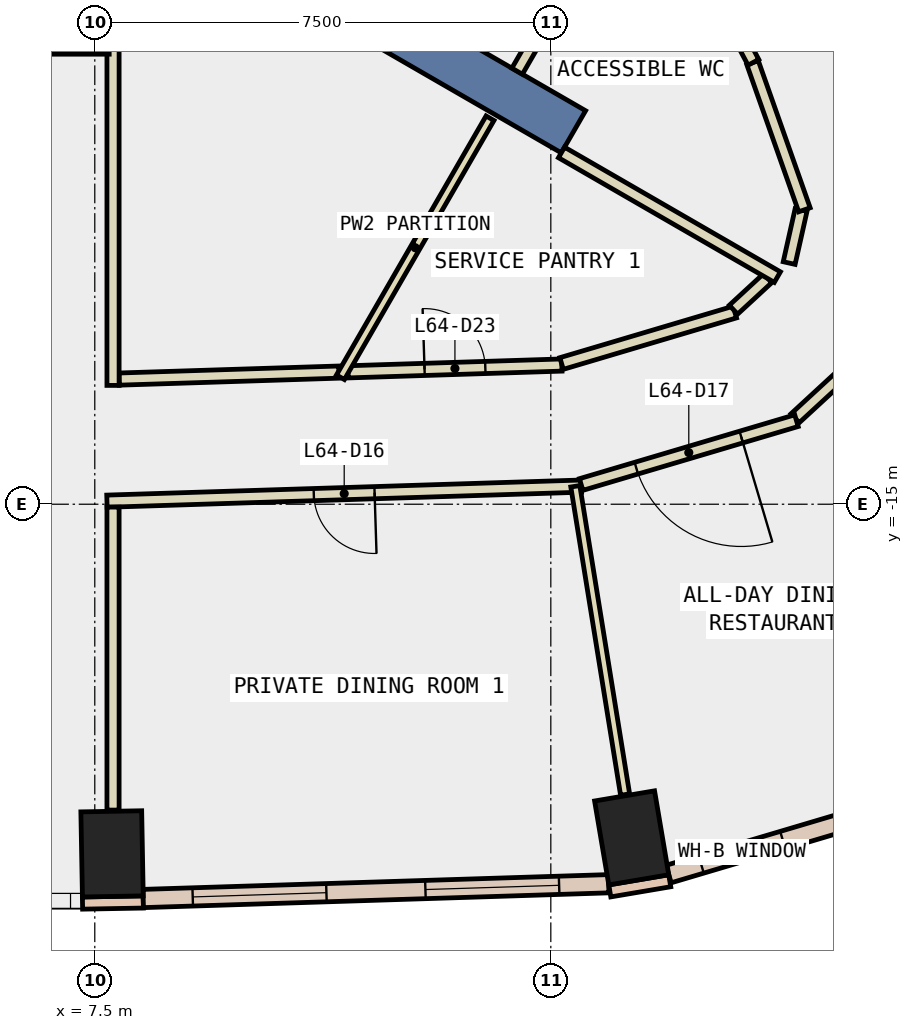
"""IFC4 building model, lengths in metres.
Left out: names, types, materials, properties, quantities, classifications, styles, units other than length and angle.
Written with IfcOpenShell. Run it as: python <this file> out.ifc"""

import sys

from ifc_helpers import new_model, si_unit, direction, frame, frame_2d, origin, origin_2d, place, context, subcontext, project, spatial, rectangle, extrude, element, fill, save


model = new_model("IFC4")
c1 = context("Model", 3, precision=1e-05, world=origin(), true_north=direction((0.0, 1.0)))
c2 = subcontext(c1, "Body", "Model", "MODEL_VIEW")
j1 = project(units=[si_unit("LENGTHUNIT", "METRE"), si_unit("PLANEANGLEUNIT", "RADIAN")], contexts=[c1])
p1 = place(None, origin())
s1 = spatial("IfcSite", under=j1, at=p1, CompositionType="ELEMENT")
p2 = place(p1, origin())
s2 = spatial("IfcBuilding", under=s1, at=p2, CompositionType="ELEMENT")
p3 = place(p2, frame((0.0, 0.0, 277.4)))
s3 = spatial("IfcBuildingStorey", under=s2, at=p3, CompositionType="ELEMENT", Elevation=277.4)
for number, where, z_axis, x_axis in (
    (1, (7.784, -20.75, -0.34), (0.0, 0.0, 1.0), (1.0, 0.018, 0.0)),
    (2, (16.33, -20.487, -0.34), (0.0, 0.0, 1.0), (0.986, 0.167, 0.0)),
):
    element("IfcColumn", number, at=place(p3, frame(where, z_axis=z_axis, x_axis=x_axis)), inside=s3, PredefinedType="COLUMN", context=c2, shape_type="SweptSolid", body=[
        extrude(rectangle(XDim=1.0, YDim=1.4, at=origin_2d()), origin(), (0.0, 0.0, 1.0), 3.34),
    ])
p4 = place(p3, frame((7.578, -4.375, -0.34), z_axis=(0.0, 0.0, 1.0), x_axis=(0.866024315419, -0.5000018851, 0.0)))
e3 = element("IfcWall", 3, at=p4, inside=s3, PredefinedType="SHEAR", context=c2, shape_type="SweptSolid", body=[
    extrude(rectangle(XDim=9.0, YDim=0.8, at=frame_2d((4.5, 0.0))), origin(), (0.0, 0.0, 1.0), 3.34),
])
for number, where, z_axis, x_axis in (
    (4, (7.298, -21.559, 0.0), (0.0, 0.0, 1.0), (1.0, 0.018, 0.0)),
    (5, (15.97, -21.359, 0.0), (0.0, 0.0, 1.0), (0.986, 0.167, 0.0)),
):
    element("IfcWall", number, at=place(p3, frame(where, z_axis=z_axis, x_axis=x_axis)), inside=s3, PredefinedType="STANDARD", context=c2, shape_type="SweptSolid", body=[
        extrude(rectangle(XDim=1.0, YDim=0.2, at=frame_2d((0.5, 0.0))), origin(), (0.0, 0.0, 1.0), 3.0),
    ])
p5 = place(p3, frame((8.296, -21.484, 0.0), z_axis=(0.0, 0.0, 1.0), x_axis=(0.999496876383, 0.031717410046, 0.0)))
e6 = element("IfcWall", 6, at=p5, inside=s3, PredefinedType="STANDARD", context=c2, shape_type="SweptSolid", body=[
    extrude(rectangle(XDim=7.659, YDim=0.3, at=frame_2d((3.83, 0.0))), origin(), (0.0, 0.0, 1.0), 3.0),
])
p6 = place(p5, frame((0.815, 0.0, 0.9)))
e7 = element("IfcOpeningElement", 7, at=p6, cuts=e6, PredefinedType="OPENING", context=c2, shape_type="SweptSolid", body=[
    extrude(rectangle(XDim=2.2, YDim=2.0, at=frame_2d((1.1, 1.0))), frame((0.0, 0.16, 0.0), z_axis=(0.0, -1.0, 0.0), x_axis=(1.0, 0.0, 0.0)), (0.0, 0.0, 1.0), 0.32),
])
p7 = place(p5, frame((4.644, 0.0, 0.9)))
e8 = element("IfcOpeningElement", 8, at=p7, cuts=e6, PredefinedType="OPENING", context=c2, shape_type="SweptSolid", body=[
    extrude(rectangle(XDim=2.2, YDim=2.0, at=frame_2d((1.1, 1.0))), frame((0.0, 0.16, 0.0), z_axis=(0.0, -1.0, 0.0), x_axis=(1.0, 0.0, 0.0)), (0.0, 0.0, 1.0), 0.32),
])
p8 = place(p3, frame((16.937, -21.082, 0.0), z_axis=(0.0, 0.0, 1.0), x_axis=(0.95864045837, 0.284619872067, 0.0)))
e9 = element("IfcWall", 9, at=p8, inside=s3, PredefinedType="STANDARD", context=c2, shape_type="SweptSolid", body=[
    extrude(rectangle(XDim=5.035, YDim=0.3, at=frame_2d((2.518, 0.0))), origin(), (0.0, 0.0, 1.0), 3.0),
])
p9 = place(p8, frame((0.559, 0.0, 0.9)))
e10 = element("IfcOpeningElement", 10, at=p9, cuts=e9, PredefinedType="OPENING", context=c2, shape_type="SweptSolid", body=[
    extrude(rectangle(XDim=1.4, YDim=2.0, at=frame_2d((0.7, 1.0))), frame((0.0, 0.16, 0.0), z_axis=(0.0, -1.0, 0.0), x_axis=(1.0, 0.0, 0.0)), (0.0, 0.0, 1.0), 0.32),
])
p10 = place(p8, frame((3.076, 0.0, 0.9)))
e11 = element("IfcOpeningElement", 11, at=p10, cuts=e9, PredefinedType="OPENING", context=c2, shape_type="SweptSolid", body=[
    extrude(rectangle(XDim=1.4, YDim=2.0, at=frame_2d((0.7, 1.0))), frame((0.0, 0.16, 0.0), z_axis=(0.0, -1.0, 0.0), x_axis=(1.0, 0.0, 0.0)), (0.0, 0.0, 1.0), 0.32),
])
p11 = place(p3, frame((7.9, -12.942, 0.0), z_axis=(0.0, 0.0, 1.0), x_axis=(0.999494468474, 0.031793198801, 0.0)))
e12 = element("IfcWall", 12, at=p11, inside=s3, PredefinedType="PARTITIONING", context=c2, shape_type="SweptSolid", body=[
    extrude(rectangle(XDim=3.617, YDim=0.2, at=frame_2d((1.808, 0.0))), origin(), (0.0, 0.0, 1.0), 3.0),
])
p12 = place(p3, frame((11.665, -12.823, 0.0), z_axis=(0.0, 0.0, 1.0), x_axis=(0.99949244941, 0.03185660956, 0.0)))
e13 = element("IfcWall", 13, at=p12, inside=s3, PredefinedType="PARTITIONING", context=c2, shape_type="SweptSolid", body=[
    extrude(rectangle(XDim=3.518, YDim=0.2, at=frame_2d((1.759, 0.0))), origin(), (0.0, 0.0, 1.0), 3.0),
])
p13 = place(p12, frame((1.259, 0.0, 0.0)))
e14 = element("IfcOpeningElement", 14, at=p13, cuts=e13, PredefinedType="OPENING", context=c2, shape_type="SweptSolid", body=[
    extrude(rectangle(XDim=1.0, YDim=2.1, at=frame_2d((0.5, 1.05))), frame((0.0, 0.11, 0.0), z_axis=(0.0, -1.0, 0.0), x_axis=(1.0, 0.0, 0.0)), (0.0, 0.0, 1.0), 0.22),
])
p14 = place(p3, frame((15.177, -12.686, 0.0), z_axis=(0.0, 0.0, 1.0), x_axis=(0.958629704259, 0.284656090947, 0.0)))
e15 = element("IfcWall", 15, at=p14, inside=s3, PredefinedType="PARTITIONING", context=c2, shape_type="SweptSolid", body=[
    extrude(rectangle(XDim=2.972, YDim=0.2, at=frame_2d((1.486, 0.0))), origin(), (0.0, 0.0, 1.0), 3.0),
])
p15 = place(p3, frame((18.004, -11.801, 0.0), z_axis=(0.0, 0.0, 1.0), x_axis=(0.735268601872, 0.677775835436, 0.0)))
e16 = element("IfcWall", 16, at=p15, inside=s3, PredefinedType="PARTITIONING", context=c2, shape_type="SweptSolid", body=[
    extrude(rectangle(XDim=0.764, YDim=0.2, at=frame_2d((0.382, 0.0))), origin(), (0.0, 0.0, 1.0), 3.0),
])
p16 = place(p3, frame((18.92, -11.034, 0.0), z_axis=(0.0, 0.0, 1.0), x_axis=(0.219096654714, 0.975703159723, 0.0)))
e17 = element("IfcWall", 17, at=p16, inside=s3, PredefinedType="PARTITIONING", context=c2, shape_type="SweptSolid", body=[
    extrude(rectangle(XDim=0.895, YDim=0.2, at=frame_2d((0.447, 0.0))), origin(), (0.0, 0.0, 1.0), 3.0),
])
p17 = place(p3, frame((19.171, -10.158, 0.0), z_axis=(0.0, 0.0, 1.0), x_axis=(-0.332486504777, 0.943108012977, 0.0)))
e18 = element("IfcWall", 18, at=p17, inside=s3, PredefinedType="PARTITIONING", context=c2, shape_type="SweptSolid", body=[
    extrude(rectangle(XDim=2.565, YDim=0.2, at=frame_2d((1.282, 0.0))), origin(), (0.0, 0.0, 1.0), 3.0),
])
p18 = place(p3, frame((18.332, -7.733, 0.0), z_axis=(0.0, 0.0, 1.0), x_axis=(-0.469639737924, 0.882858152006, 0.0)))
e19 = element("IfcWall", 19, at=p18, inside=s3, PredefinedType="PARTITIONING", context=c2, shape_type="SweptSolid", body=[
    extrude(rectangle(XDim=3.782, YDim=0.2, at=frame_2d((1.891, 0.0))), origin(), (0.0, 0.0, 1.0), 3.0),
])
p19 = place(p18, frame((1.391, 0.0, 0.0)))
e20 = element("IfcOpeningElement", 20, at=p19, cuts=e19, PredefinedType="OPENING", context=c2, shape_type="SweptSolid", body=[
    extrude(rectangle(XDim=1.0, YDim=2.1, at=frame_2d((0.5, 1.05))), frame((0.0, 0.11, 0.0), z_axis=(0.0, -1.0, 0.0), x_axis=(1.0, 0.0, 0.0)), (0.0, 0.0, 1.0), 0.22),
])
p20 = place(p3, frame((15.503, -14.702, 0.0), z_axis=(0.0, 0.0, 1.0), x_axis=(-0.999495120537, -0.031772693047, 0.0)))
e21 = element("IfcWall", 21, at=p20, inside=s3, PredefinedType="PARTITIONING", context=c2, shape_type="SweptSolid", body=[
    extrude(rectangle(XDim=7.807, YDim=0.2, at=frame_2d((3.903, 0.0))), origin(), (0.0, 0.0, 1.0), 3.0),
])
p21 = place(p20, frame((3.403, 0.0, 0.0)))
e22 = element("IfcOpeningElement", 22, at=p21, cuts=e21, PredefinedType="OPENING", context=c2, shape_type="SweptSolid", body=[
    extrude(rectangle(XDim=1.0, YDim=2.1, at=frame_2d((0.5, 1.05))), frame((0.0, 0.11, 0.0), z_axis=(0.0, -1.0, 0.0), x_axis=(1.0, 0.0, 0.0)), (0.0, 0.0, 1.0), 0.22),
])
p22 = place(p3, frame((20.83, -11.917, 0.0), z_axis=(0.0, 0.0, 1.0), x_axis=(-0.735547704352, -0.67747293276, 0.0)))
e23 = element("IfcWall", 23, at=p22, inside=s3, PredefinedType="PARTITIONING", context=c2, shape_type="SweptSolid", body=[
    extrude(rectangle(XDim=2.463, YDim=0.2, at=frame_2d((1.232, 0.0))), origin(), (0.0, 0.0, 1.0), 3.0),
])
p23 = place(p3, frame((19.04, -13.626, 0.0), z_axis=(0.0, 0.0, 1.0), x_axis=(-0.958734738219, -0.284302131073, 0.0)))
e24 = element("IfcWall", 24, at=p23, inside=s3, PredefinedType="PARTITIONING", context=c2, shape_type="SweptSolid", body=[
    extrude(rectangle(XDim=3.693, YDim=0.2, at=frame_2d((1.847, 0.0))), origin(), (0.0, 0.0, 1.0), 3.0),
])
p24 = place(p23, frame((0.947, 0.0, 0.0)))
e25 = element("IfcOpeningElement", 25, at=p24, cuts=e24, PredefinedType="OPENING", context=c2, shape_type="SweptSolid", body=[
    extrude(rectangle(XDim=1.8, YDim=2.1, at=frame_2d((0.9, 1.05))), frame((0.0, 0.11, 0.0), z_axis=(0.0, -1.0, 0.0), x_axis=(1.0, 0.0, 0.0)), (0.0, 0.0, 1.0), 0.22),
])
p25 = place(p3, frame((7.8, -7.499, 0.0), z_axis=(0.0, 0.0, 1.0), x_axis=(0.0, -1.0, 0.0)))
e26 = element("IfcWall", 26, at=p25, inside=s3, PredefinedType="PARTITIONING", context=c2, shape_type="SweptSolid", body=[
    extrude(rectangle(XDim=5.547, YDim=0.2, at=frame_2d((2.773, 0.0))), origin(), (0.0, 0.0, 1.0), 3.0),
])
p26 = place(p3, frame((7.8, -15.047, 0.0), z_axis=(0.0, 0.0, 1.0), x_axis=(0.0, -1.0, 0.0)))
e27 = element("IfcWall", 27, at=p26, inside=s3, PredefinedType="PARTITIONING", context=c2, shape_type="SweptSolid", body=[
    extrude(rectangle(XDim=4.983, YDim=0.2, at=frame_2d((2.491, 0.0))), origin(), (0.0, 0.0, 1.0), 3.0),
])
p27 = place(p3, frame((14.0, -8.652, 0.0), z_axis=(0.0, 0.0, 1.0), x_axis=(-0.500067562424, -0.865986393087, 0.0)))
e28 = element("IfcWall", 28, at=p27, inside=s3, PredefinedType="PARTITIONING", context=c2, shape_type="SweptSolid", body=[
    extrude(rectangle(XDim=4.919, YDim=0.15, at=frame_2d((2.459, 0.0))), origin(), (0.0, 0.0, 1.0), 3.0),
])
p28 = place(p3, frame((16.559, -4.219, 0.0), z_axis=(0.0, 0.0, 1.0), x_axis=(-0.499997491977, -0.866026851788, 0.0)))
e29 = element("IfcWall", 29, at=p28, inside=s3, PredefinedType="PARTITIONING", context=c2, shape_type="SweptSolid", body=[
    extrude(rectangle(XDim=4.226, YDim=0.2, at=frame_2d((2.113, 0.0))), origin(), (0.0, 0.0, 1.0), 3.0),
])
p29 = place(p3, frame((15.176, -9.215, 0.0), z_axis=(0.0, 0.0, 1.0), x_axis=(0.866006068523, -0.500033488159, 0.0)))
e30 = element("IfcWall", 30, at=p29, inside=s3, PredefinedType="PARTITIONING", context=c2, shape_type="SweptSolid", body=[
    extrude(rectangle(XDim=4.099, YDim=0.2, at=frame_2d((2.05, 0.0))), origin(), (0.0, 0.0, 1.0), 3.0),
])
p30 = place(p3, frame((15.403, -14.705, 0.0), z_axis=(0.0, 0.0, 1.0), x_axis=(0.159447664828, -0.98720638277, 0.0)))
e31 = element("IfcWall", 31, at=p30, inside=s3, PredefinedType="PARTITIONING", context=c2, shape_type="SweptSolid", body=[
    extrude(rectangle(XDim=5.135, YDim=0.15, at=frame_2d((2.568, 0.0))), origin(), (0.0, 0.0, 1.0), 3.0),
])
p31 = place(p3, frame((5.944, -7.499, 0.0), z_axis=(0.0, 0.0, 1.0), x_axis=(1.0, 0.0, 0.0)))
e32 = element("IfcWall", 32, at=p31, inside=s3, PredefinedType="PARTITIONING", context=c2, shape_type="SweptSolid", body=[
    extrude(rectangle(XDim=1.793, YDim=0.2, at=frame_2d((0.896, 0.0))), origin(), (0.0, 0.0, 1.0), 3.0),
])
p32 = place(p6, origin())
e33 = element("IfcWindow", 33, at=p32, inside=s3, PartitioningType="SINGLE_PANEL", PredefinedType="WINDOW", context=c2, shape_type="SweptSolid", body=[
    extrude(rectangle(XDim=2.2, YDim=2.0, at=frame_2d((1.1, 1.0))), frame((0.0, 0.03, 0.0), z_axis=(0.0, -1.0, 0.0), x_axis=(1.0, 0.0, 0.0)), (0.0, 0.0, 1.0), 0.06),
])
fill(e7, e33)
p33 = place(p7, origin())
e34 = element("IfcWindow", 34, at=p33, inside=s3, PartitioningType="SINGLE_PANEL", PredefinedType="WINDOW", context=c2, shape_type="SweptSolid", body=[
    extrude(rectangle(XDim=2.2, YDim=2.0, at=frame_2d((1.1, 1.0))), frame((0.0, 0.03, 0.0), z_axis=(0.0, -1.0, 0.0), x_axis=(1.0, 0.0, 0.0)), (0.0, 0.0, 1.0), 0.06),
])
fill(e8, e34)
p34 = place(p9, origin())
e35 = element("IfcWindow", 35, at=p34, inside=s3, PartitioningType="SINGLE_PANEL", PredefinedType="WINDOW", context=c2, shape_type="SweptSolid", body=[
    extrude(rectangle(XDim=1.4, YDim=2.0, at=frame_2d((0.7, 1.0))), frame((0.0, 0.03, 0.0), z_axis=(0.0, -1.0, 0.0), x_axis=(1.0, 0.0, 0.0)), (0.0, 0.0, 1.0), 0.06),
])
fill(e10, e35)
p35 = place(p21, origin())
e36 = element("IfcDoor", 36, at=p35, inside=s3, OperationType="SINGLE_SWING_LEFT", PredefinedType="DOOR", context=c2, shape_type="SweptSolid", body=[
    extrude(rectangle(XDim=1.0, YDim=2.1, at=frame_2d((0.5, 1.05))), frame((0.0, 0.025, 0.0), z_axis=(0.0, -1.0, 0.0), x_axis=(1.0, 0.0, 0.0)), (0.0, 0.0, 1.0), 0.05),
])
fill(e22, e36)
p36 = place(p24, origin())
e37 = element("IfcDoor", 37, at=p36, inside=s3, OperationType="DOUBLE_DOOR_SINGLE_SWING", PredefinedType="DOOR", context=c2, shape_type="SweptSolid", body=[
    extrude(rectangle(XDim=1.8, YDim=2.1, at=frame_2d((0.9, 1.05))), frame((0.0, 0.025, 0.0), z_axis=(0.0, -1.0, 0.0), x_axis=(1.0, 0.0, 0.0)), (0.0, 0.0, 1.0), 0.05),
])
fill(e25, e37)
p37 = place(p13, origin())
e38 = element("IfcDoor", 38, at=p37, inside=s3, OperationType="SINGLE_SWING_RIGHT", PredefinedType="DOOR", context=c2, shape_type="SweptSolid", body=[
    extrude(rectangle(XDim=1.0, YDim=2.1, at=frame_2d((0.5, 1.05))), frame((0.0, 0.025, 0.0), z_axis=(0.0, -1.0, 0.0), x_axis=(1.0, 0.0, 0.0)), (0.0, 0.0, 1.0), 0.05),
])
fill(e14, e38)
save(model, sys.argv[1])
